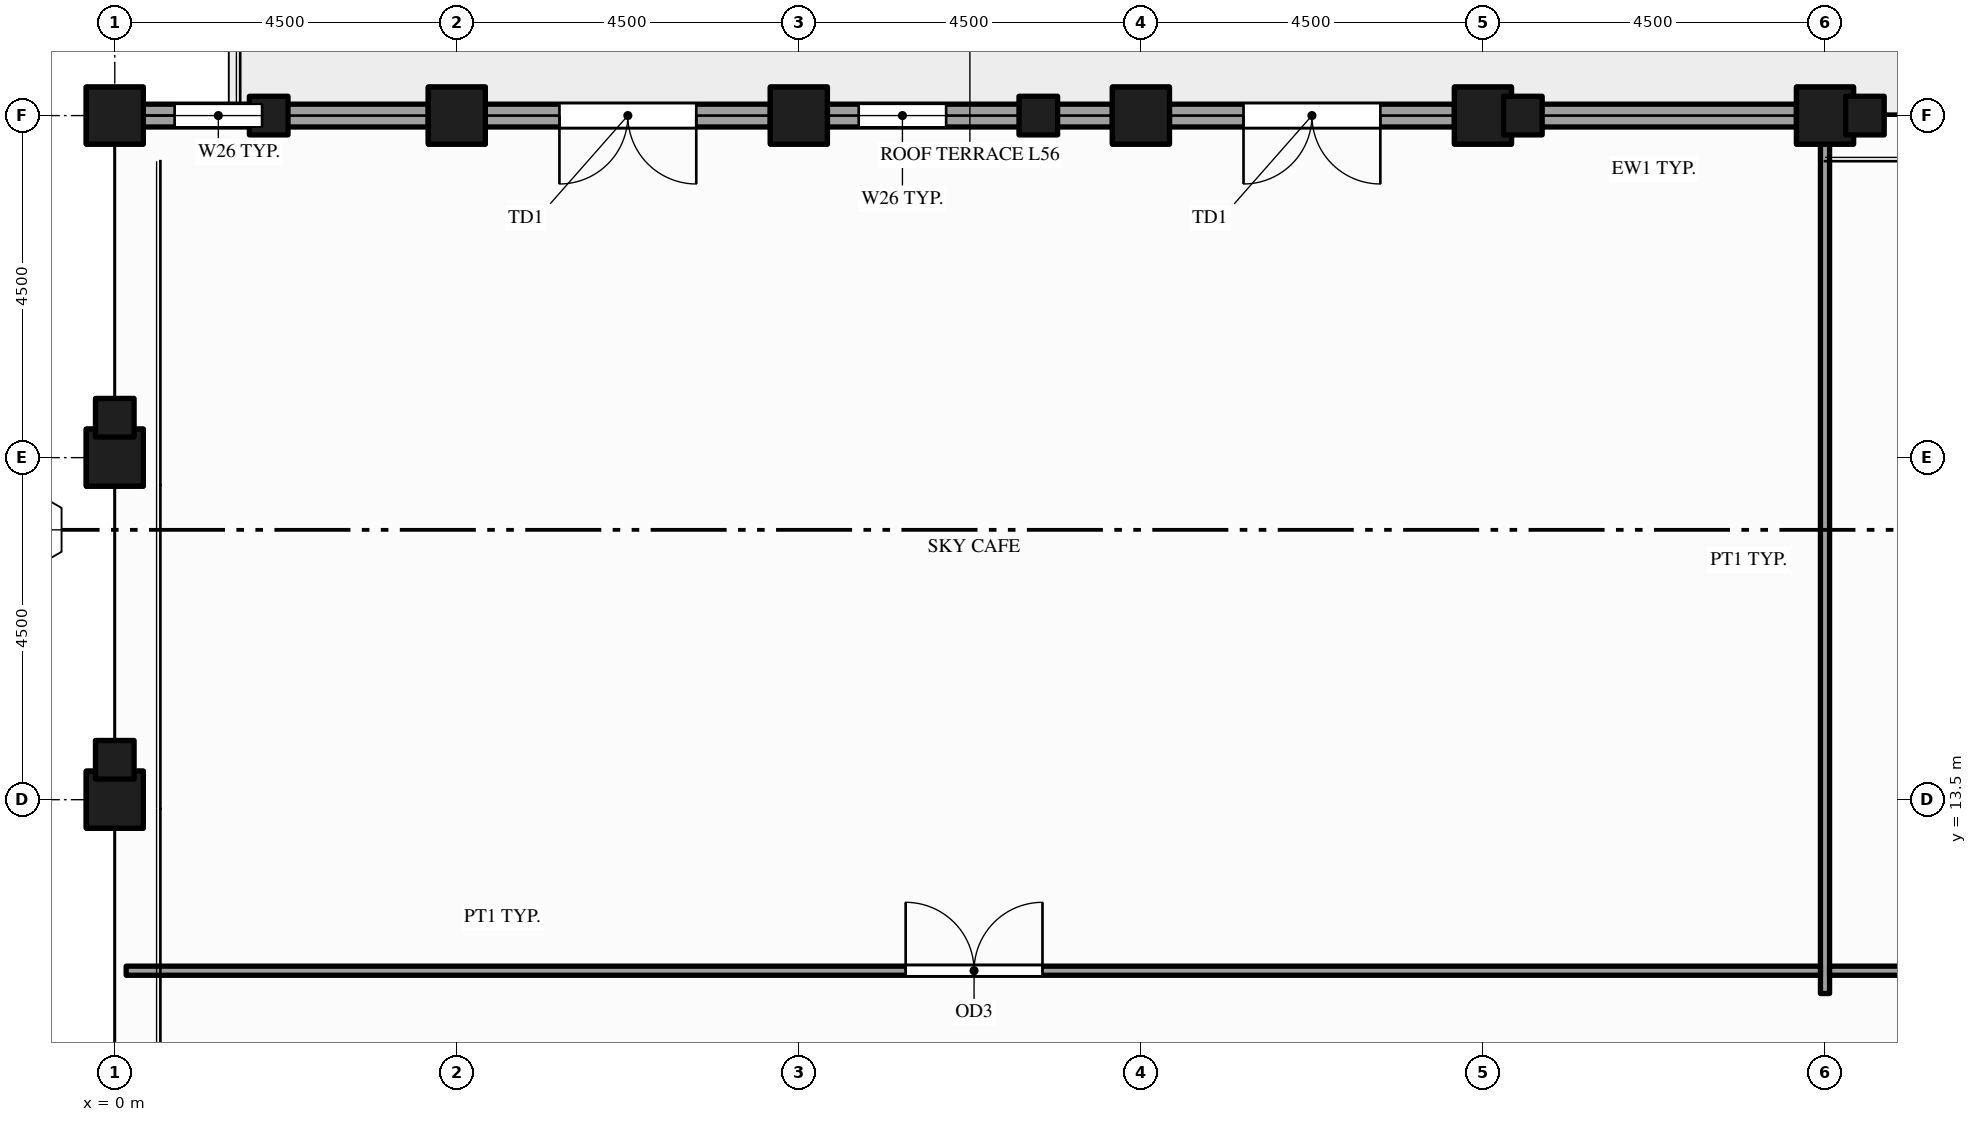
"""IFC4 building model, lengths in metres.
Left out: names, types, materials, properties, quantities, classifications, styles, units other than length and angle.
Written with IfcOpenShell. Run it as: python <this file> out.ifc"""

import sys

from ifc_helpers import new_model, si_unit, direction, frame, frame_2d, origin, origin_2d, place, context, subcontext, project, spatial, rectangle, hollow_rectangle, extrude, element, fill, save


model = new_model("IFC4")
c1 = context("Model", 3, precision=1e-05, world=origin(), true_north=direction((0.0, 1.0)))
c2 = subcontext(c1, "Body", "Model", "MODEL_VIEW")
j1 = project(units=[si_unit("LENGTHUNIT", "METRE"), si_unit("PLANEANGLEUNIT", "RADIAN")], contexts=[c1])
p1 = place(None, origin())
s1 = spatial("IfcSite", under=j1, at=p1, CompositionType="ELEMENT")
p2 = place(p1, origin())
s2 = spatial("IfcBuilding", under=s1, at=p2, CompositionType="ELEMENT")
p3 = place(p2, frame((0.0, 0.0, 243.0)))
s3 = spatial("IfcBuildingStorey", under=s2, at=p3, CompositionType="ELEMENT", Elevation=243.0)
p4 = place(p3, frame((0.0, 13.5, -0.25), z_axis=(0.0, 0.0, 1.0), x_axis=(1.0, 0.0, 0.0)))
e1 = element("IfcColumn", 1, at=p4, inside=s3, PredefinedType="COLUMN", context=c2, shape_type="SweptSolid", body=[
    extrude(hollow_rectangle(XDim=0.75, YDim=0.75, WallThickness=0.036, at=origin_2d()), origin(), (0.0, 0.0, 1.0), 4.6),
])
p5 = place(p3, frame((0.0, 13.5, 4.35), z_axis=(0.0, 0.0, 1.0), x_axis=(1.0, 0.0, 0.0)))
e2 = element("IfcColumn", 2, at=p5, inside=s3, PredefinedType="COLUMN", context=c2, shape_type="SweptSolid", body=[
    extrude(rectangle(XDim=0.75, YDim=0.75, at=origin_2d()), origin(), (0.0, 0.0, 1.0), 1.5),
])
p6 = place(p3, frame((0.0, 18.0, -0.25), z_axis=(0.0, 0.0, 1.0), x_axis=(1.0, 0.0, 0.0)))
e3 = element("IfcColumn", 3, at=p6, inside=s3, PredefinedType="COLUMN", context=c2, shape_type="SweptSolid", body=[
    extrude(hollow_rectangle(XDim=0.75, YDim=0.75, WallThickness=0.036, at=origin_2d()), origin(), (0.0, 0.0, 1.0), 4.6),
])
p7 = place(p3, frame((0.0, 18.0, 4.35), z_axis=(0.0, 0.0, 1.0), x_axis=(1.0, 0.0, 0.0)))
e4 = element("IfcColumn", 4, at=p7, inside=s3, PredefinedType="COLUMN", context=c2, shape_type="SweptSolid", body=[
    extrude(rectangle(XDim=0.75, YDim=0.75, at=origin_2d()), origin(), (0.0, 0.0, 1.0), 1.5),
])
p8 = place(p3, frame((0.0, 22.5, -0.3), z_axis=(0.0, 0.0, 1.0), x_axis=(1.0, 0.0, 0.0)))
e5 = element("IfcColumn", 5, at=p8, inside=s3, PredefinedType="COLUMN", context=c2, shape_type="SweptSolid", body=[
    extrude(hollow_rectangle(XDim=0.75, YDim=0.75, WallThickness=0.036, at=origin_2d()), origin(), (0.0, 0.0, 1.0), 4.65),
])
p9 = place(p3, frame((0.0, 22.5, 4.35), z_axis=(0.0, 0.0, 1.0), x_axis=(1.0, 0.0, 0.0)))
e6 = element("IfcColumn", 6, at=p9, inside=s3, PredefinedType="COLUMN", context=c2, shape_type="SweptSolid", body=[
    extrude(rectangle(XDim=0.75, YDim=0.75, at=origin_2d()), origin(), (0.0, 0.0, 1.0), 1.5),
])
p10 = place(p3, frame((4.5, 22.5, -0.3), z_axis=(0.0, 0.0, 1.0), x_axis=(1.0, 0.0, 0.0)))
e7 = element("IfcColumn", 7, at=p10, inside=s3, PredefinedType="COLUMN", context=c2, shape_type="SweptSolid", body=[
    extrude(hollow_rectangle(XDim=0.75, YDim=0.75, WallThickness=0.036, at=origin_2d()), origin(), (0.0, 0.0, 1.0), 4.65),
])
p11 = place(p3, frame((4.5, 22.5, 4.35), z_axis=(0.0, 0.0, 1.0), x_axis=(1.0, 0.0, 0.0)))
e8 = element("IfcColumn", 8, at=p11, inside=s3, PredefinedType="COLUMN", context=c2, shape_type="SweptSolid", body=[
    extrude(rectangle(XDim=0.75, YDim=0.75, at=origin_2d()), origin(), (0.0, 0.0, 1.0), 1.5),
])
p12 = place(p3, frame((9.0, 22.5, -0.3), z_axis=(0.0, 0.0, 1.0), x_axis=(1.0, 0.0, 0.0)))
e9 = element("IfcColumn", 9, at=p12, inside=s3, PredefinedType="COLUMN", context=c2, shape_type="SweptSolid", body=[
    extrude(hollow_rectangle(XDim=0.75, YDim=0.75, WallThickness=0.036, at=origin_2d()), origin(), (0.0, 0.0, 1.0), 4.65),
])
p13 = place(p3, frame((9.0, 22.5, 4.35), z_axis=(0.0, 0.0, 1.0), x_axis=(1.0, 0.0, 0.0)))
e10 = element("IfcColumn", 10, at=p13, inside=s3, PredefinedType="COLUMN", context=c2, shape_type="SweptSolid", body=[
    extrude(rectangle(XDim=0.75, YDim=0.75, at=origin_2d()), origin(), (0.0, 0.0, 1.0), 1.5),
])
p14 = place(p3, frame((13.5, 22.5, -0.3), z_axis=(0.0, 0.0, 1.0), x_axis=(1.0, 0.0, 0.0)))
e11 = element("IfcColumn", 11, at=p14, inside=s3, PredefinedType="COLUMN", context=c2, shape_type="SweptSolid", body=[
    extrude(hollow_rectangle(XDim=0.75, YDim=0.75, WallThickness=0.036, at=origin_2d()), origin(), (0.0, 0.0, 1.0), 4.65),
])
p15 = place(p3, frame((13.5, 22.5, 4.35), z_axis=(0.0, 0.0, 1.0), x_axis=(1.0, 0.0, 0.0)))
e12 = element("IfcColumn", 12, at=p15, inside=s3, PredefinedType="COLUMN", context=c2, shape_type="SweptSolid", body=[
    extrude(rectangle(XDim=0.75, YDim=0.75, at=origin_2d()), origin(), (0.0, 0.0, 1.0), 1.5),
])
p16 = place(p3, frame((18.0, 22.5, -0.3), z_axis=(0.0, 0.0, 1.0), x_axis=(1.0, 0.0, 0.0)))
e13 = element("IfcColumn", 13, at=p16, inside=s3, PredefinedType="COLUMN", context=c2, shape_type="SweptSolid", body=[
    extrude(hollow_rectangle(XDim=0.75, YDim=0.75, WallThickness=0.036, at=origin_2d()), origin(), (0.0, 0.0, 1.0), 4.65),
])
p17 = place(p3, frame((18.0, 22.5, 4.35), z_axis=(0.0, 0.0, 1.0), x_axis=(1.0, 0.0, 0.0)))
e14 = element("IfcColumn", 14, at=p17, inside=s3, PredefinedType="COLUMN", context=c2, shape_type="SweptSolid", body=[
    extrude(rectangle(XDim=0.75, YDim=0.75, at=origin_2d()), origin(), (0.0, 0.0, 1.0), 1.5),
])
p18 = place(p3, frame((22.5, 22.5, -0.3), z_axis=(0.0, 0.0, 1.0), x_axis=(1.0, 0.0, 0.0)))
e15 = element("IfcColumn", 15, at=p18, inside=s3, PredefinedType="COLUMN", context=c2, shape_type="SweptSolid", body=[
    extrude(hollow_rectangle(XDim=0.75, YDim=0.75, WallThickness=0.036, at=origin_2d()), origin(), (0.0, 0.0, 1.0), 4.65),
])
p19 = place(p3, frame((22.5, 22.5, 4.35), z_axis=(0.0, 0.0, 1.0), x_axis=(1.0, 0.0, 0.0)))
e16 = element("IfcColumn", 16, at=p19, inside=s3, PredefinedType="COLUMN", context=c2, shape_type="SweptSolid", body=[
    extrude(rectangle(XDim=0.75, YDim=0.75, at=origin_2d()), origin(), (0.0, 0.0, 1.0), 1.5),
])
p20 = place(p3, frame((22.125, 22.5, 0.0), z_axis=(0.0, 0.0, 1.0), x_axis=(-1.0, 0.0, 0.0)))
e17 = element("IfcWall", 17, at=p20, inside=s3, PredefinedType="STANDARD", context=c2, shape_type="SweptSolid", body=[
    extrude(rectangle(XDim=3.75, YDim=0.3, at=frame_2d((1.875, 0.0))), origin(), (0.0, 0.0, 1.0), 5.157),
])
p21 = place(p3, frame((17.625, 22.5, 0.0), z_axis=(0.0, 0.0, 1.0), x_axis=(-1.0, 0.0, 0.0)))
e18 = element("IfcWall", 18, at=p21, inside=s3, PredefinedType="STANDARD", context=c2, shape_type="SweptSolid", body=[
    extrude(rectangle(XDim=3.75, YDim=0.3, at=frame_2d((1.875, 0.0))), origin(), (0.0, 0.0, 1.0), 5.157),
])
p22 = place(p21, frame((0.975, 0.0, 0.0)))
e19 = element("IfcOpeningElement", 19, at=p22, cuts=e18, PredefinedType="OPENING", context=c2, shape_type="SweptSolid", body=[
    extrude(rectangle(XDim=1.8, YDim=2.4, at=frame_2d((0.9, 1.2))), frame((0.0, 0.16, 0.0), z_axis=(0.0, -1.0, 0.0), x_axis=(1.0, 0.0, 0.0)), (0.0, 0.0, 1.0), 0.32),
])
p23 = place(p3, frame((13.125, 22.5, 0.0), z_axis=(0.0, 0.0, 1.0), x_axis=(-1.0, 0.0, 0.0)))
e20 = element("IfcWall", 20, at=p23, inside=s3, PredefinedType="STANDARD", context=c2, shape_type="SweptSolid", body=[
    extrude(rectangle(XDim=3.75, YDim=0.3, at=frame_2d((1.875, 0.0))), origin(), (0.0, 0.0, 1.0), 5.157),
])
p24 = place(p23, frame((2.188, 0.0, 0.9)))
e21 = element("IfcOpeningElement", 21, at=p24, cuts=e20, PredefinedType="OPENING", context=c2, shape_type="SweptSolid", body=[
    extrude(rectangle(XDim=1.15, YDim=3.5, at=frame_2d((0.575, 1.75))), frame((0.0, 0.16, 0.0), z_axis=(0.0, -1.0, 0.0), x_axis=(1.0, 0.0, 0.0)), (0.0, 0.0, 1.0), 0.32),
])
p25 = place(p3, frame((8.625, 22.5, 0.0), z_axis=(0.0, 0.0, 1.0), x_axis=(-1.0, 0.0, 0.0)))
e22 = element("IfcWall", 22, at=p25, inside=s3, PredefinedType="STANDARD", context=c2, shape_type="SweptSolid", body=[
    extrude(rectangle(XDim=3.75, YDim=0.3, at=frame_2d((1.875, 0.0))), origin(), (0.0, 0.0, 1.0), 5.157),
])
p26 = place(p25, frame((0.975, 0.0, 0.0)))
e23 = element("IfcOpeningElement", 23, at=p26, cuts=e22, PredefinedType="OPENING", context=c2, shape_type="SweptSolid", body=[
    extrude(rectangle(XDim=1.8, YDim=2.4, at=frame_2d((0.9, 1.2))), frame((0.0, 0.16, 0.0), z_axis=(0.0, -1.0, 0.0), x_axis=(1.0, 0.0, 0.0)), (0.0, 0.0, 1.0), 0.32),
])
p27 = place(p3, frame((4.125, 22.5, 0.0), z_axis=(0.0, 0.0, 1.0), x_axis=(-1.0, 0.0, 0.0)))
e24 = element("IfcWall", 24, at=p27, inside=s3, PredefinedType="STANDARD", context=c2, shape_type="SweptSolid", body=[
    extrude(rectangle(XDim=3.75, YDim=0.3, at=frame_2d((1.875, 0.0))), origin(), (0.0, 0.0, 1.0), 5.157),
])
p28 = place(p27, frame((2.188, 0.0, 0.9)))
e25 = element("IfcOpeningElement", 25, at=p28, cuts=e24, PredefinedType="OPENING", context=c2, shape_type="SweptSolid", body=[
    extrude(rectangle(XDim=1.15, YDim=3.5, at=frame_2d((0.575, 1.75))), frame((0.0, 0.16, 0.0), z_axis=(0.0, -1.0, 0.0), x_axis=(1.0, 0.0, 0.0)), (0.0, 0.0, 1.0), 0.32),
])
p29 = place(p3, frame((22.5, 10.95, 0.0), z_axis=(0.0, 0.0, 1.0), x_axis=(0.0, 1.0, 0.0)))
e26 = element("IfcWall", 26, at=p29, inside=s3, PredefinedType="PARTITIONING", context=c2, shape_type="SweptSolid", body=[
    extrude(rectangle(XDim=11.4, YDim=0.12, at=frame_2d((5.7, 0.0))), origin(), (0.0, 0.0, 1.0), 4.87),
])
p30 = place(p3, frame((0.15, 11.25, 0.0), z_axis=(0.0, 0.0, 1.0), x_axis=(1.0, 0.0, 0.0)))
e27 = element("IfcWall", 27, at=p30, inside=s3, PredefinedType="PARTITIONING", context=c2, shape_type="SweptSolid", body=[
    extrude(rectangle(XDim=22.29, YDim=0.12, at=frame_2d((11.145, 0.0))), origin(), (0.0, 0.0, 1.0), 4.87),
])
p31 = place(p30, frame((10.255, 0.0, 0.0)))
e28 = element("IfcOpeningElement", 28, at=p31, cuts=e27, PredefinedType="OPENING", context=c2, shape_type="SweptSolid", body=[
    extrude(rectangle(XDim=1.8, YDim=2.1, at=frame_2d((0.9, 1.05))), frame((0.0, 0.07, 0.0), z_axis=(0.0, -1.0, 0.0), x_axis=(1.0, 0.0, 0.0)), (0.0, 0.0, 1.0), 0.14),
])
p32 = place(p3, frame((22.56, 11.25, 0.0), z_axis=(0.0, 0.0, 1.0), x_axis=(1.0, 0.0, 0.0)))
e29 = element("IfcWall", 29, at=p32, inside=s3, PredefinedType="PARTITIONING", context=c2, shape_type="SweptSolid", body=[
    extrude(rectangle(XDim=8.88, YDim=0.12, at=frame_2d((4.44, 0.0))), origin(), (0.0, 0.0, 1.0), 4.87),
])
p33 = place(p32, frame((3.84, 0.0, 0.0)))
e30 = element("IfcOpeningElement", 30, at=p33, cuts=e29, PredefinedType="OPENING", context=c2, shape_type="SweptSolid", body=[
    extrude(rectangle(XDim=1.2, YDim=2.1, at=frame_2d((0.6, 1.05))), frame((0.0, 0.07, 0.0), z_axis=(0.0, -1.0, 0.0), x_axis=(1.0, 0.0, 0.0)), (0.0, 0.0, 1.0), 0.14),
])
p34 = place(p22, origin())
e31 = element("IfcDoor", 31, at=p34, inside=s3, OperationType="DOUBLE_DOOR_SINGLE_SWING", PredefinedType="DOOR", context=c2, shape_type="SweptSolid", body=[
    extrude(rectangle(XDim=1.8, YDim=2.4, at=frame_2d((0.9, 1.2))), frame((0.0, 0.025, 0.0), z_axis=(0.0, -1.0, 0.0), x_axis=(1.0, 0.0, 0.0)), (0.0, 0.0, 1.0), 0.05),
])
fill(e19, e31)
p35 = place(p24, origin())
e32 = element("IfcWindow", 32, at=p35, inside=s3, PartitioningType="SINGLE_PANEL", PredefinedType="WINDOW", context=c2, shape_type="SweptSolid", body=[
    extrude(rectangle(XDim=1.15, YDim=3.5, at=frame_2d((0.575, 1.75))), frame((0.0, 0.03, 0.0), z_axis=(0.0, -1.0, 0.0), x_axis=(1.0, 0.0, 0.0)), (0.0, 0.0, 1.0), 0.06),
])
fill(e21, e32)
p36 = place(p26, origin())
e33 = element("IfcDoor", 33, at=p36, inside=s3, OperationType="DOUBLE_DOOR_SINGLE_SWING", PredefinedType="DOOR", context=c2, shape_type="SweptSolid", body=[
    extrude(rectangle(XDim=1.8, YDim=2.4, at=frame_2d((0.9, 1.2))), frame((0.0, 0.025, 0.0), z_axis=(0.0, -1.0, 0.0), x_axis=(1.0, 0.0, 0.0)), (0.0, 0.0, 1.0), 0.05),
])
fill(e23, e33)
p37 = place(p28, origin())
e34 = element("IfcWindow", 34, at=p37, inside=s3, PartitioningType="SINGLE_PANEL", PredefinedType="WINDOW", context=c2, shape_type="SweptSolid", body=[
    extrude(rectangle(XDim=1.15, YDim=3.5, at=frame_2d((0.575, 1.75))), frame((0.0, 0.03, 0.0), z_axis=(0.0, -1.0, 0.0), x_axis=(1.0, 0.0, 0.0)), (0.0, 0.0, 1.0), 0.06),
])
fill(e25, e34)
p38 = place(p31, origin())
e35 = element("IfcDoor", 35, at=p38, inside=s3, OperationType="DOUBLE_DOOR_SINGLE_SWING", PredefinedType="DOOR", context=c2, shape_type="SweptSolid", body=[
    extrude(rectangle(XDim=1.8, YDim=2.1, at=frame_2d((0.9, 1.05))), frame((0.0, 0.025, 0.0), z_axis=(0.0, -1.0, 0.0), x_axis=(1.0, 0.0, 0.0)), (0.0, 0.0, 1.0), 0.05),
])
fill(e28, e35)
save(model, sys.argv[1])
